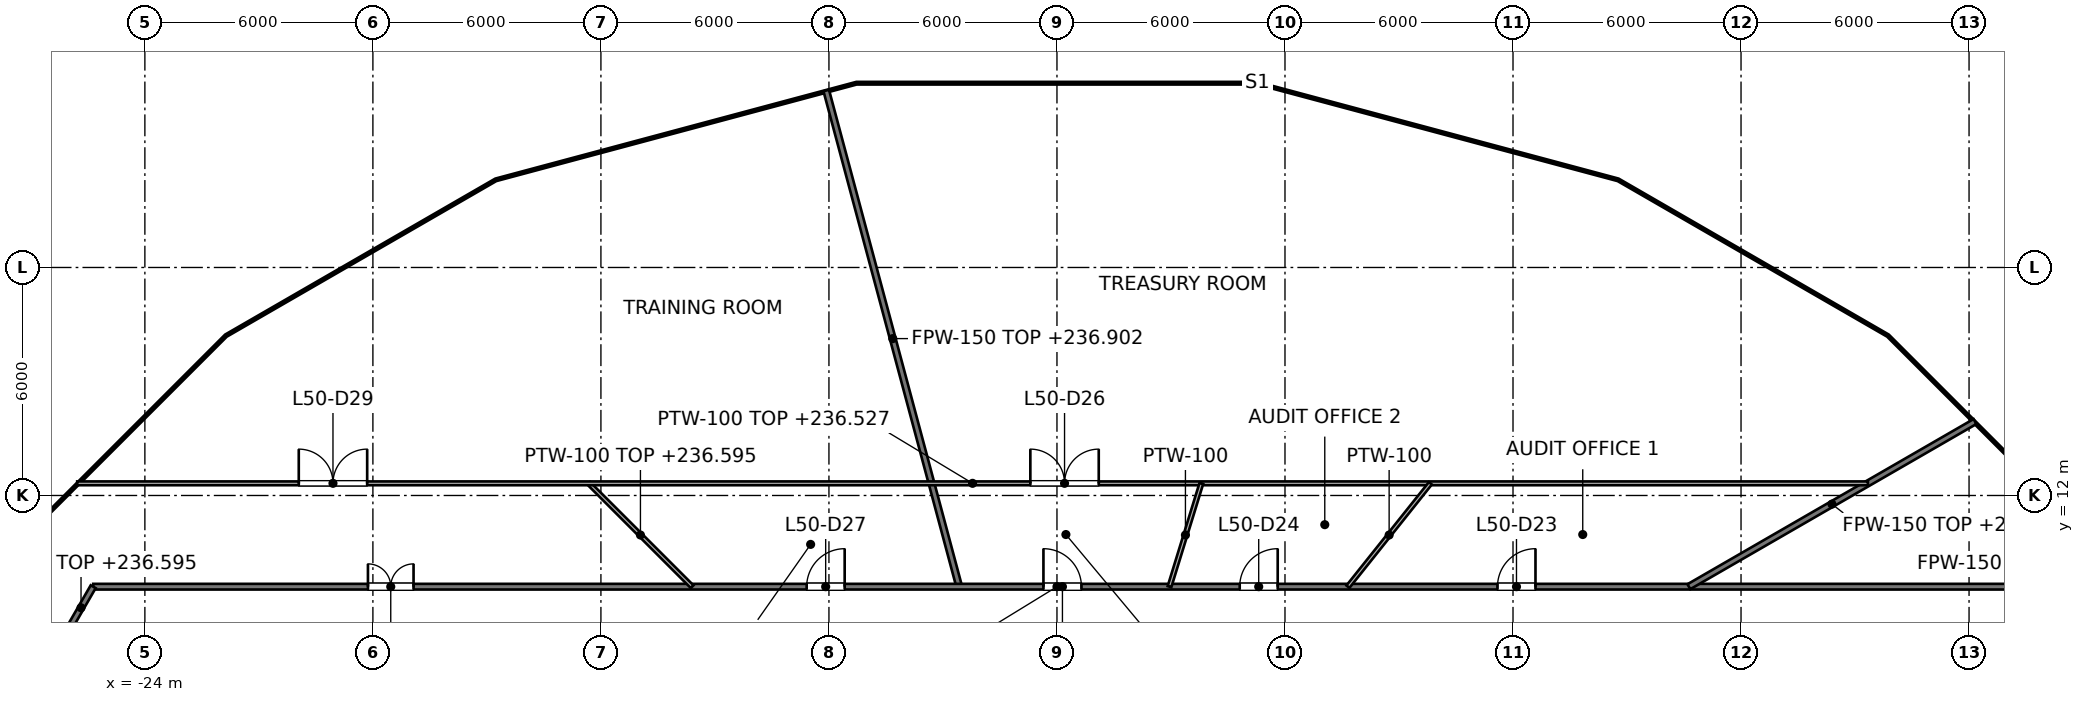
"""IFC4 building model, lengths in metres.
Left out: names, types, materials, properties, quantities, classifications, styles, units other than length and angle.
Written with IfcOpenShell. Run it as: python <this file> out.ifc"""

import sys

from ifc_helpers import new_model, si_unit, direction, frame, frame_2d, origin, place, context, subcontext, project, spatial, rectangle, extrude, element, fill, save


model = new_model("IFC4")
c1 = context("Model", 3, precision=1e-05, world=origin(), true_north=direction((0.0, 1.0)))
c2 = subcontext(c1, "Body", "Model", "MODEL_VIEW")
j1 = project(units=[si_unit("LENGTHUNIT", "METRE"), si_unit("PLANEANGLEUNIT", "RADIAN")], contexts=[c1])
p1 = place(None, origin())
s1 = spatial("IfcSite", under=j1, at=p1, CompositionType="ELEMENT")
p2 = place(p1, origin())
s2 = spatial("IfcBuilding", under=s1, at=p2, CompositionType="ELEMENT")
p3 = place(p2, frame((0.0, 0.0, 233.6)))
s3 = spatial("IfcBuildingStorey", under=s2, at=p3, CompositionType="ELEMENT", Elevation=233.6)
p4 = place(p3, frame((-6.071, 22.657, 0.0), z_axis=(0.0, 0.0, 1.0), x_axis=(0.258866383335, -0.965913140805, 0.0)))
e1 = element("IfcWall", 1, at=p4, inside=s3, PredefinedType="PARTITIONING", context=c2, shape_type="SweptSolid", body=[
    extrude(rectangle(XDim=13.518, YDim=0.15, at=frame_2d((6.759, 0.0))), origin(), (0.0, 0.0, 1.0), 3.302),
])
p5 = place(p3, frame((-25.36, 9.6, 0.0), z_axis=(0.0, 0.0, 1.0), x_axis=(1.0, 0.0, 0.0)))
e2 = element("IfcWall", 2, at=p5, inside=s3, PredefinedType="PARTITIONING", context=c2, shape_type="SweptSolid", body=[
    extrude(rectangle(XDim=50.721, YDim=0.15, at=frame_2d((25.361, 0.0))), origin(), (0.0, 0.0, 1.0), 2.927),
])
p6 = place(p5, frame((36.951, 0.0, 0.0)))
e3 = element("IfcOpeningElement", 3, at=p6, cuts=e2, PredefinedType="OPENING", context=c2, shape_type="SweptSolid", body=[
    extrude(rectangle(XDim=1.0, YDim=2.1, at=frame_2d((0.5, 1.05))), frame((0.0, 0.075, 0.0), z_axis=(0.0, -1.0, 0.0), x_axis=(1.0, 0.0, 0.0)), (0.0, 0.0, 1.0), 0.15),
])
p7 = place(p5, frame((30.168, 0.0, 0.0)))
e4 = element("IfcOpeningElement", 4, at=p7, cuts=e2, PredefinedType="OPENING", context=c2, shape_type="SweptSolid", body=[
    extrude(rectangle(XDim=1.0, YDim=2.1, at=frame_2d((0.5, 1.05))), frame((0.0, 0.075, 0.0), z_axis=(0.0, -1.0, 0.0), x_axis=(1.0, 0.0, 0.0)), (0.0, 0.0, 1.0), 0.15),
])
p8 = place(p5, frame((25.004, 0.0, 0.0)))
e5 = element("IfcOpeningElement", 5, at=p8, cuts=e2, PredefinedType="OPENING", context=c2, shape_type="SweptSolid", body=[
    extrude(rectangle(XDim=1.0, YDim=2.1, at=frame_2d((0.5, 1.05))), frame((0.0, 0.075, 0.0), z_axis=(0.0, -1.0, 0.0), x_axis=(1.0, 0.0, 0.0)), (0.0, 0.0, 1.0), 0.15),
])
p9 = place(p5, frame((18.774, 0.0, 0.0)))
e6 = element("IfcOpeningElement", 6, at=p9, cuts=e2, PredefinedType="OPENING", context=c2, shape_type="SweptSolid", body=[
    extrude(rectangle(XDim=1.0, YDim=2.1, at=frame_2d((0.5, 1.05))), frame((0.0, 0.075, 0.0), z_axis=(0.0, -1.0, 0.0), x_axis=(1.0, 0.0, 0.0)), (0.0, 0.0, 1.0), 0.15),
])
p10 = place(p5, frame((7.23, 0.0, 0.0)))
e7 = element("IfcOpeningElement", 7, at=p10, cuts=e2, PredefinedType="OPENING", context=c2, shape_type="SweptSolid", body=[
    extrude(rectangle(XDim=1.2, YDim=2.1, at=frame_2d((0.6, 1.05))), frame((0.0, 0.075, 0.0), z_axis=(0.0, -1.0, 0.0), x_axis=(1.0, 0.0, 0.0)), (0.0, 0.0, 1.0), 0.15),
])
p11 = place(p3, frame((16.628, 9.6, 0.0), z_axis=(0.0, 0.0, 1.0), x_axis=(0.866056969008, 0.499945323442, 0.0)))
e8 = element("IfcWall", 8, at=p11, inside=s3, PredefinedType="PARTITIONING", context=c2, shape_type="SweptSolid", body=[
    extrude(rectangle(XDim=8.692, YDim=0.15, at=frame_2d((4.346, 0.0))), origin(), (0.0, 0.0, 1.0), 3.076),
])
p12 = place(p3, frame((-26.0, 8.491, 0.0), z_axis=(0.0, 0.0, 1.0), x_axis=(0.499953532967, 0.866052229876, 0.0)))
e9 = element("IfcWall", 9, at=p12, inside=s3, PredefinedType="PARTITIONING", context=c2, shape_type="SweptSolid", body=[
    extrude(rectangle(XDim=1.28, YDim=0.15, at=frame_2d((0.64, 0.0))), origin(), (0.0, 0.0, 1.0), 2.995),
])
p13 = place(p3, frame((-12.32, 12.32, 0.0), z_axis=(0.0, 0.0, 1.0), x_axis=(0.707106781187, -0.707106781187, 0.0)))
e10 = element("IfcWall", 10, at=p13, inside=s3, PredefinedType="PARTITIONING", context=c2, shape_type="SweptSolid", body=[
    extrude(rectangle(XDim=3.847, YDim=0.1, at=frame_2d((1.923, 0.0))), origin(), (0.0, 0.0, 1.0), 2.995),
])
p14 = place(p3, frame((-25.781, 12.32, 0.0), z_axis=(0.0, 0.0, 1.0), x_axis=(1.0, 0.0, 0.0)))
e11 = element("IfcWall", 11, at=p14, inside=s3, PredefinedType="PARTITIONING", context=c2, shape_type="SweptSolid", body=[
    extrude(rectangle(XDim=47.12, YDim=0.1, at=frame_2d((23.56, 0.0))), origin(), (0.0, 0.0, 1.0), 2.927),
])
p15 = place(p14, frame((25.081, 0.0, 0.0)))
e12 = element("IfcOpeningElement", 12, at=p15, cuts=e11, PredefinedType="OPENING", context=c2, shape_type="SweptSolid", body=[
    extrude(rectangle(XDim=1.8, YDim=2.1, at=frame_2d((0.9, 1.05))), frame((0.0, 0.05, 0.0), z_axis=(0.0, -1.0, 0.0), x_axis=(1.0, 0.0, 0.0)), (0.0, 0.0, 1.0), 0.1),
])
p16 = place(p14, frame((5.831, 0.0, 0.0)))
e13 = element("IfcOpeningElement", 13, at=p16, cuts=e11, PredefinedType="OPENING", context=c2, shape_type="SweptSolid", body=[
    extrude(rectangle(XDim=1.8, YDim=2.1, at=frame_2d((0.9, 1.05))), frame((0.0, 0.05, 0.0), z_axis=(0.0, -1.0, 0.0), x_axis=(1.0, 0.0, 0.0)), (0.0, 0.0, 1.0), 0.1),
])
p17 = place(p3, frame((7.656, 9.6, 0.0), z_axis=(0.0, 0.0, 1.0), x_axis=(0.623461874371, 0.78185375308, 0.0)))
e14 = element("IfcWall", 14, at=p17, inside=s3, PredefinedType="PARTITIONING", context=c2, shape_type="SweptSolid", body=[
    extrude(rectangle(XDim=3.479, YDim=0.1, at=frame_2d((1.739, 0.0))), origin(), (0.0, 0.0, 1.0), 3.85),
])
p18 = place(p3, frame((2.961, 9.6, 0.0), z_axis=(0.0, 0.0, 1.0), x_axis=(0.294790935958, 0.955561774077, 0.0)))
e15 = element("IfcWall", 15, at=p18, inside=s3, PredefinedType="PARTITIONING", context=c2, shape_type="SweptSolid", body=[
    extrude(rectangle(XDim=2.846, YDim=0.1, at=frame_2d((1.423, 0.0))), origin(), (0.0, 0.0, 1.0), 3.85),
])
p19 = place(p6, origin())
e16 = element("IfcDoor", 16, at=p19, inside=s3, OperationType="SINGLE_SWING_RIGHT", PredefinedType="DOOR", context=c2, shape_type="SweptSolid", body=[
    extrude(rectangle(XDim=1.0, YDim=2.1, at=frame_2d((0.5, 1.05))), frame((0.0, 0.025, 0.0), z_axis=(0.0, -1.0, 0.0), x_axis=(1.0, 0.0, 0.0)), (0.0, 0.0, 1.0), 0.05),
])
fill(e3, e16)
p20 = place(p7, origin())
e17 = element("IfcDoor", 17, at=p20, inside=s3, OperationType="SINGLE_SWING_RIGHT", PredefinedType="DOOR", context=c2, shape_type="SweptSolid", body=[
    extrude(rectangle(XDim=1.0, YDim=2.1, at=frame_2d((0.5, 1.05))), frame((0.0, 0.025, 0.0), z_axis=(0.0, -1.0, 0.0), x_axis=(1.0, 0.0, 0.0)), (0.0, 0.0, 1.0), 0.05),
])
fill(e4, e17)
p21 = place(p8, origin())
e18 = element("IfcDoor", 18, at=p21, inside=s3, OperationType="SINGLE_SWING_LEFT", PredefinedType="DOOR", context=c2, shape_type="SweptSolid", body=[
    extrude(rectangle(XDim=1.0, YDim=2.1, at=frame_2d((0.5, 1.05))), frame((0.0, 0.025, 0.0), z_axis=(0.0, -1.0, 0.0), x_axis=(1.0, 0.0, 0.0)), (0.0, 0.0, 1.0), 0.05),
])
fill(e5, e18)
p22 = place(p15, origin())
e19 = element("IfcDoor", 19, at=p22, inside=s3, OperationType="DOUBLE_DOOR_SINGLE_SWING", PredefinedType="DOOR", context=c2, shape_type="SweptSolid", body=[
    extrude(rectangle(XDim=1.8, YDim=2.1, at=frame_2d((0.9, 1.05))), frame((0.0, 0.025, 0.0), z_axis=(0.0, -1.0, 0.0), x_axis=(1.0, 0.0, 0.0)), (0.0, 0.0, 1.0), 0.05),
])
fill(e12, e19)
p23 = place(p9, origin())
e20 = element("IfcDoor", 20, at=p23, inside=s3, OperationType="SINGLE_SWING_RIGHT", PredefinedType="DOOR", context=c2, shape_type="SweptSolid", body=[
    extrude(rectangle(XDim=1.0, YDim=2.1, at=frame_2d((0.5, 1.05))), frame((0.0, 0.025, 0.0), z_axis=(0.0, -1.0, 0.0), x_axis=(1.0, 0.0, 0.0)), (0.0, 0.0, 1.0), 0.05),
])
fill(e6, e20)
p24 = place(p10, origin())
e21 = element("IfcDoor", 21, at=p24, inside=s3, OperationType="DOUBLE_DOOR_SINGLE_SWING", PredefinedType="DOOR", context=c2, shape_type="SweptSolid", body=[
    extrude(rectangle(XDim=1.2, YDim=2.1, at=frame_2d((0.6, 1.05))), frame((0.0, 0.025, 0.0), z_axis=(0.0, -1.0, 0.0), x_axis=(1.0, 0.0, 0.0)), (0.0, 0.0, 1.0), 0.05),
])
fill(e7, e21)
p25 = place(p16, origin())
e22 = element("IfcDoor", 22, at=p25, inside=s3, OperationType="DOUBLE_DOOR_SINGLE_SWING", PredefinedType="DOOR", context=c2, shape_type="SweptSolid", body=[
    extrude(rectangle(XDim=1.8, YDim=2.1, at=frame_2d((0.9, 1.05))), frame((0.0, 0.025, 0.0), z_axis=(0.0, -1.0, 0.0), x_axis=(1.0, 0.0, 0.0)), (0.0, 0.0, 1.0), 0.05),
])
fill(e13, e22)
save(model, sys.argv[1])
